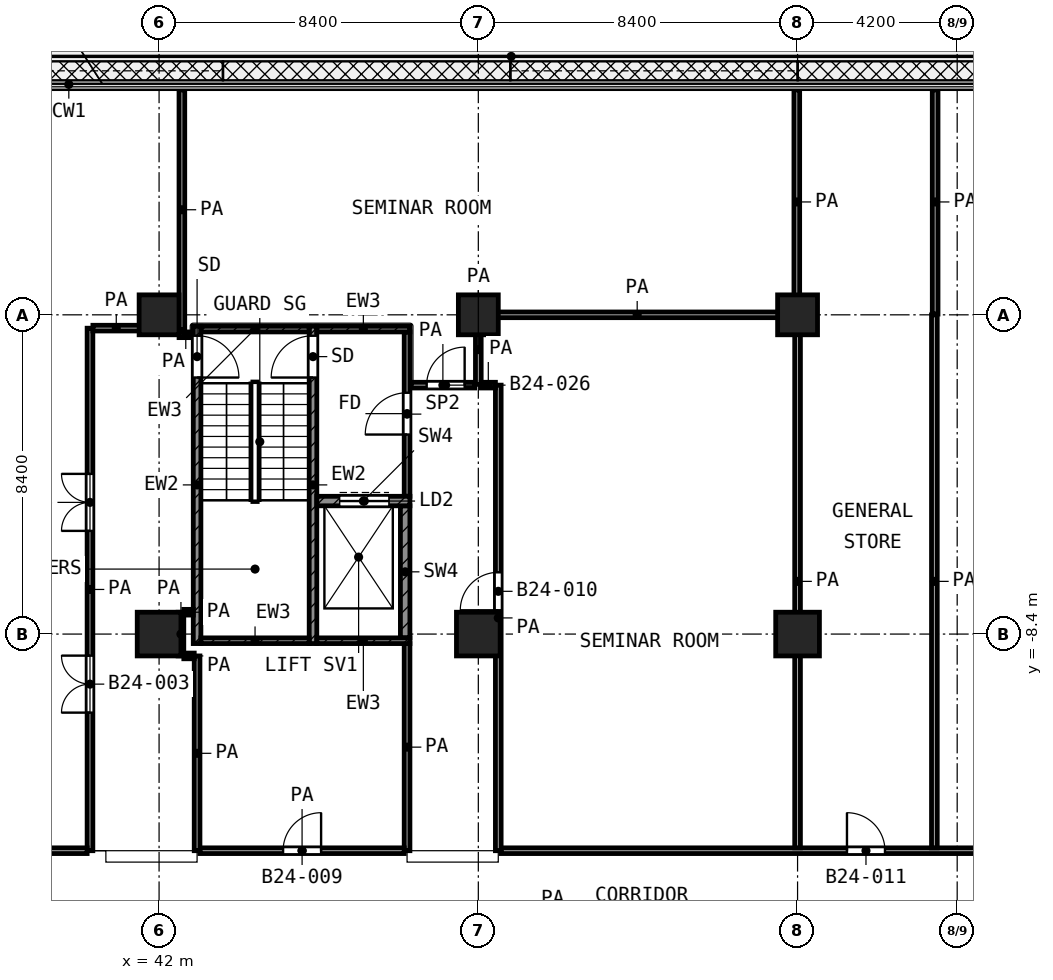
"""IFC4 building model, lengths in metres.
Left out: names, types, materials, properties, quantities, classifications, styles, units other than length and angle.
Written with IfcOpenShell. Run it as: python <this file> out.ifc"""

import sys

from ifc_helpers import new_model, si_unit, direction, frame, frame_2d, origin, origin_2d, place, context, subcontext, project, spatial, rectangle, extrude, element, fill, save


model = new_model("IFC4")
c1 = context("Model", 3, precision=1e-05, world=origin(), true_north=direction((0.0, 1.0)))
c2 = subcontext(c1, "Body", "Model", "MODEL_VIEW")
j1 = project(units=[si_unit("LENGTHUNIT", "METRE"), si_unit("PLANEANGLEUNIT", "RADIAN")], contexts=[c1])
p1 = place(None, origin())
s1 = spatial("IfcSite", under=j1, at=p1, CompositionType="ELEMENT")
p2 = place(p1, origin())
s2 = spatial("IfcBuilding", under=s1, at=p2, CompositionType="ELEMENT")
p3 = place(p2, frame((0.0, 0.0, 107.2)))
s3 = spatial("IfcBuildingStorey", under=s2, at=p3, CompositionType="ELEMENT", Elevation=107.2)
for number, where, z_axis, x_axis in (
    (1, (42.0, 0.0, 0.0), (0.0, 0.0, 1.0), (1.0, 0.0, 0.0)),
    (2, (50.4, 0.0, 0.0), (0.0, 0.0, 1.0), (1.0, 0.0, 0.0)),
    (3, (58.8, 0.0, 0.0), (0.0, 0.0, 1.0), (1.0, 0.0, 0.0)),
):
    element("IfcColumn", number, at=place(p3, frame(where, z_axis=z_axis, x_axis=x_axis)), inside=s3, PredefinedType="COLUMN", context=c2, shape_type="SweptSolid", body=[
        extrude(rectangle(XDim=1.05, YDim=1.05, at=origin_2d()), origin(), (0.0, 0.0, 1.0), 4.2),
    ])
for number, where, z_axis, x_axis in (
    (4, (42.0, -8.4, 0.0), (0.0, 0.0, 1.0), (1.0, 0.0, 0.0)),
    (5, (50.4, -8.4, 0.0), (0.0, 0.0, 1.0), (1.0, 0.0, 0.0)),
    (6, (58.8, -8.4, 0.0), (0.0, 0.0, 1.0), (1.0, 0.0, 0.0)),
):
    element("IfcColumn", number, at=place(p3, frame(where, z_axis=z_axis, x_axis=x_axis)), inside=s3, PredefinedType="COLUMN", context=c2, shape_type="SweptSolid", body=[
        extrude(rectangle(XDim=1.15, YDim=1.15, at=origin_2d()), origin(), (0.0, 0.0, 1.0), 4.2),
    ])
p4 = place(p3, frame((43.0, -8.65, 0.0), z_axis=(0.0, 0.0, 1.0), x_axis=(0.0, 1.0, 0.0)))
e7 = element("IfcWall", 7, at=p4, inside=s3, PredefinedType="SHEAR", context=c2, shape_type="SweptSolid", body=[
    extrude(rectangle(XDim=8.35, YDim=0.2, at=frame_2d((4.175, 0.0))), origin(), (0.0, 0.0, 1.0), 3.6),
])
p5 = place(p4, frame((7.0, 0.0, 0.0)))
e8 = element("IfcOpeningElement", 8, at=p5, cuts=e7, PredefinedType="OPENING", context=c2, shape_type="SweptSolid", body=[
    extrude(rectangle(XDim=1.1, YDim=2.1, at=frame_2d((0.55, 1.05))), frame((0.0, 0.11, 0.0), z_axis=(0.0, -1.0, 0.0), x_axis=(1.0, 0.0, 0.0)), (0.0, 0.0, 1.0), 0.22),
])
p6 = place(p3, frame((46.05, -8.65, 0.0), z_axis=(0.0, 0.0, 1.0), x_axis=(0.0, 1.0, 0.0)))
e9 = element("IfcWall", 9, at=p6, inside=s3, PredefinedType="SHEAR", context=c2, shape_type="SweptSolid", body=[
    extrude(rectangle(XDim=8.35, YDim=0.2, at=frame_2d((4.175, 0.0))), origin(), (0.0, 0.0, 1.0), 3.6),
])
p7 = place(p6, frame((7.0, 0.0, 0.0)))
e10 = element("IfcOpeningElement", 10, at=p7, cuts=e9, PredefinedType="OPENING", context=c2, shape_type="SweptSolid", body=[
    extrude(rectangle(XDim=1.1, YDim=2.1, at=frame_2d((0.55, 1.05))), frame((0.0, 0.11, 0.0), z_axis=(0.0, -1.0, 0.0), x_axis=(1.0, 0.0, 0.0)), (0.0, 0.0, 1.0), 0.22),
])
p8 = place(p3, frame((43.1, -0.375, 0.0), z_axis=(0.0, 0.0, 1.0), x_axis=(1.0, 0.0, 0.0)))
e11 = element("IfcWall", 11, at=p8, inside=s3, PredefinedType="SHEAR", context=c2, shape_type="SweptSolid", body=[
    extrude(rectangle(XDim=2.85, YDim=0.15, at=frame_2d((1.425, 0.0))), origin(), (0.0, 0.0, 1.0), 3.6),
])
p9 = place(p3, frame((46.15, -0.375, 0.0), z_axis=(0.0, 0.0, 1.0), x_axis=(1.0, 0.0, 0.0)))
e12 = element("IfcWall", 12, at=p9, inside=s3, PredefinedType="SHEAR", context=c2, shape_type="SweptSolid", body=[
    extrude(rectangle(XDim=2.45, YDim=0.15, at=frame_2d((1.225, 0.0))), origin(), (0.0, 0.0, 1.0), 3.6),
])
p10 = place(p3, frame((43.1, -8.575, 0.0), z_axis=(0.0, 0.0, 1.0), x_axis=(1.0, 0.0, 0.0)))
e13 = element("IfcWall", 13, at=p10, inside=s3, PredefinedType="SHEAR", context=c2, shape_type="SweptSolid", body=[
    extrude(rectangle(XDim=2.85, YDim=0.15, at=frame_2d((1.425, 0.0))), origin(), (0.0, 0.0, 1.0), 3.6),
])
p11 = place(p3, frame((46.15, -8.575, 0.0), z_axis=(0.0, 0.0, 1.0), x_axis=(1.0, 0.0, 0.0)))
e14 = element("IfcWall", 14, at=p11, inside=s3, PredefinedType="SHEAR", context=c2, shape_type="SweptSolid", body=[
    extrude(rectangle(XDim=2.45, YDim=0.15, at=frame_2d((1.225, 0.0))), origin(), (0.0, 0.0, 1.0), 3.6),
])
p12 = place(p3, frame((46.15, -4.9, 0.0), z_axis=(0.0, 0.0, 1.0), x_axis=(1.0, 0.0, 0.0)))
e15 = element("IfcWall", 15, at=p12, inside=s3, PredefinedType="SHEAR", context=c2, shape_type="SweptSolid", body=[
    extrude(rectangle(XDim=2.45, YDim=0.25, at=frame_2d((1.225, 0.0))), origin(), (0.0, 0.0, 1.0), 3.6),
])
p13 = place(p12, frame((0.6, 0.0, 0.0)))
e16 = element("IfcOpeningElement", 16, at=p13, cuts=e15, PredefinedType="OPENING", context=c2, shape_type="SweptSolid", body=[
    extrude(rectangle(XDim=1.3, YDim=2.1, at=frame_2d((0.65, 1.05))), frame((0.0, 0.135, 0.0), z_axis=(0.0, -1.0, 0.0), x_axis=(1.0, 0.0, 0.0)), (0.0, 0.0, 1.0), 0.27),
])
p14 = place(p3, frame((48.475, -8.5, 0.0), z_axis=(0.0, 0.0, 1.0), x_axis=(0.0, 1.0, 0.0)))
e17 = element("IfcWall", 17, at=p14, inside=s3, PredefinedType="SHEAR", context=c2, shape_type="SweptSolid", body=[
    extrude(rectangle(XDim=3.475, YDim=0.25, at=frame_2d((1.738, 0.0))), origin(), (0.0, 0.0, 1.0), 3.6),
])
p15 = place(p3, frame((48.525, -4.775, 0.0), z_axis=(0.0, 0.0, 1.0), x_axis=(0.0, 1.0, 0.0)))
e18 = element("IfcWall", 18, at=p15, inside=s3, PredefinedType="PARTITIONING", context=c2, shape_type="SweptSolid", body=[
    extrude(rectangle(XDim=4.325, YDim=0.15, at=frame_2d((2.163, 0.0))), origin(), (0.0, 0.0, 1.0), 3.6),
])
p16 = place(p15, frame((1.625, 0.0, 0.0)))
e19 = element("IfcOpeningElement", 19, at=p16, cuts=e18, PredefinedType="OPENING", context=c2, shape_type="SweptSolid", body=[
    extrude(rectangle(XDim=1.1, YDim=2.1, at=frame_2d((0.55, 1.05))), frame((0.0, 0.085, 0.0), z_axis=(0.0, -1.0, 0.0), x_axis=(1.0, 0.0, 0.0)), (0.0, 0.0, 1.0), 0.17),
])
p17 = place(p3, frame((29.475, -14.1, 0.0), z_axis=(0.0, 0.0, 1.0), x_axis=(1.0, 0.0, 0.0)))
e20 = element("IfcWall", 20, at=p17, inside=s3, PredefinedType="PARTITIONING", context=c2, shape_type="SweptSolid", body=[
    extrude(rectangle(XDim=10.632, YDim=0.15, at=frame_2d((5.316, 0.0))), origin(), (0.0, 0.0, 1.0), 3.6),
])
p18 = place(p3, frame((43.075, -14.1, 0.0), z_axis=(0.0, 0.0, 1.0), x_axis=(1.0, 0.0, 0.0)))
e21 = element("IfcWall", 21, at=p18, inside=s3, PredefinedType="PARTITIONING", context=c2, shape_type="SweptSolid", body=[
    extrude(rectangle(XDim=5.375, YDim=0.15, at=frame_2d((2.688, 0.0))), origin(), (0.0, 0.0, 1.0), 3.6),
])
p19 = place(p18, frame((2.188, 0.0, 0.0)))
e22 = element("IfcOpeningElement", 22, at=p19, cuts=e21, PredefinedType="OPENING", context=c2, shape_type="SweptSolid", body=[
    extrude(rectangle(XDim=1.0, YDim=2.1, at=frame_2d((0.5, 1.05))), frame((0.0, 0.085, 0.0), z_axis=(0.0, -1.0, 0.0), x_axis=(1.0, 0.0, 0.0)), (0.0, 0.0, 1.0), 0.17),
])
p20 = place(p3, frame((51.0, -14.1, 0.0), z_axis=(0.0, 0.0, 1.0), x_axis=(1.0, 0.0, 0.0)))
e23 = element("IfcWall", 23, at=p20, inside=s3, PredefinedType="PARTITIONING", context=c2, shape_type="SweptSolid", body=[
    extrude(rectangle(XDim=28.72, YDim=0.15, at=frame_2d((14.36, 0.0))), origin(), (0.0, 0.0, 1.0), 3.6),
])
p21 = place(p20, frame((9.1, 0.0, 0.0)))
e24 = element("IfcOpeningElement", 24, at=p21, cuts=e23, PredefinedType="OPENING", context=c2, shape_type="SweptSolid", body=[
    extrude(rectangle(XDim=1.0, YDim=2.1, at=frame_2d((0.5, 1.05))), frame((0.0, 0.085, 0.0), z_axis=(0.0, -1.0, 0.0), x_axis=(1.0, 0.0, 0.0)), (0.0, 0.0, 1.0), 0.17),
])
p22 = place(p20, frame((19.35, 0.0, 0.0)))
e25 = element("IfcOpeningElement", 25, at=p22, cuts=e23, PredefinedType="OPENING", context=c2, shape_type="SweptSolid", body=[
    extrude(rectangle(XDim=1.5, YDim=2.1, at=frame_2d((0.75, 1.05))), frame((0.0, 0.085, 0.0), z_axis=(0.0, -1.0, 0.0), x_axis=(1.0, 0.0, 0.0)), (0.0, 0.0, 1.0), 0.17),
])
p23 = place(p3, frame((42.651, -8.975, 0.0), z_axis=(0.0, 0.0, 1.0), x_axis=(1.0, 0.0, 0.0)))
e26 = element("IfcWall", 26, at=p23, inside=s3, PredefinedType="PARTITIONING", context=c2, shape_type="SweptSolid", body=[
    extrude(rectangle(XDim=0.274, YDim=0.15, at=frame_2d((0.137, 0.0))), origin(), (0.0, 0.0, 1.0), 3.6),
])
p24 = place(p3, frame((42.651, -7.825, 0.0), z_axis=(0.0, 0.0, 1.0), x_axis=(1.0, 0.0, 0.0)))
e27 = element("IfcWall", 27, at=p24, inside=s3, PredefinedType="PARTITIONING", context=c2, shape_type="SweptSolid", body=[
    extrude(rectangle(XDim=0.249, YDim=0.15, at=frame_2d((0.125, 0.0))), origin(), (0.0, 0.0, 1.0), 3.6),
])
p25 = place(p3, frame((48.63, -1.85, 0.0), z_axis=(0.0, 0.0, 1.0), x_axis=(1.0, 0.0, 0.0)))
e28 = element("IfcWall", 28, at=p25, inside=s3, PredefinedType="PARTITIONING", context=c2, shape_type="SweptSolid", body=[
    extrude(rectangle(XDim=1.675, YDim=0.15, at=frame_2d((0.837, 0.0))), origin(), (0.0, 0.0, 1.0), 3.6),
])
p26 = place(p25, frame((0.41, 0.0, 0.0)))
e29 = element("IfcOpeningElement", 29, at=p26, cuts=e28, PredefinedType="OPENING", context=c2, shape_type="SweptSolid", body=[
    extrude(rectangle(XDim=1.0, YDim=2.1, at=frame_2d((0.5, 1.05))), frame((0.0, 0.085, 0.0), z_axis=(0.0, -1.0, 0.0), x_axis=(1.0, 0.0, 0.0)), (0.0, 0.0, 1.0), 0.17),
])
p27 = place(p3, frame((50.475, -1.85, 0.0), z_axis=(0.0, 0.0, 1.0), x_axis=(1.0, 0.0, 0.0)))
e30 = element("IfcWall", 30, at=p27, inside=s3, PredefinedType="PARTITIONING", context=c2, shape_type="SweptSolid", body=[
    extrude(rectangle(XDim=0.375, YDim=0.15, at=frame_2d((0.188, 0.0))), origin(), (0.0, 0.0, 1.0), 3.6),
])
p28 = place(p3, frame((42.526, -0.525, 0.0), z_axis=(0.0, 0.0, 1.0), x_axis=(1.0, 0.0, 0.0)))
e31 = element("IfcWall", 31, at=p28, inside=s3, PredefinedType="PARTITIONING", context=c2, shape_type="SweptSolid", body=[
    extrude(rectangle(XDim=0.353, YDim=0.15, at=frame_2d((0.177, 0.0))), origin(), (0.0, 0.0, 1.0), 3.6),
])
p29 = place(p3, frame((40.259, -0.35, 0.0), z_axis=(0.0, 0.0, 1.0), x_axis=(1.0, 0.0, 0.0)))
e32 = element("IfcWall", 32, at=p29, inside=s3, PredefinedType="PARTITIONING", context=c2, shape_type="SweptSolid", body=[
    extrude(rectangle(XDim=1.229, YDim=0.15, at=frame_2d((0.615, 0.0))), origin(), (0.0, 0.0, 1.0), 3.6),
])
p30 = place(p3, frame((50.475, 0.0, 0.0), z_axis=(0.0, 0.0, 1.0), x_axis=(1.0, 0.0, 0.0)))
e33 = element("IfcWall", 33, at=p30, inside=s3, PredefinedType="PARTITIONING", context=c2, shape_type="SweptSolid", body=[
    extrude(rectangle(XDim=8.21, YDim=0.15, at=frame_2d((4.105, 0.0))), origin(), (0.0, 0.0, 1.0), 3.6),
])
p31 = place(p3, frame((40.182, -14.1, 0.0), z_axis=(0.0, 0.0, 1.0), x_axis=(0.0, 1.0, 0.0)))
e34 = element("IfcWall", 34, at=p31, inside=s3, PredefinedType="PARTITIONING", context=c2, shape_type="SweptSolid", body=[
    extrude(rectangle(XDim=13.748, YDim=0.15, at=frame_2d((6.874, 0.0))), origin(), (0.0, 0.0, 1.0), 3.6),
])
p32 = place(p31, frame((3.633, 0.0, 0.0)))
e35 = element("IfcOpeningElement", 35, at=p32, cuts=e34, PredefinedType="OPENING", context=c2, shape_type="SweptSolid", body=[
    extrude(rectangle(XDim=1.5, YDim=2.1, at=frame_2d((0.75, 1.05))), frame((0.0, 0.085, 0.0), z_axis=(0.0, -1.0, 0.0), x_axis=(1.0, 0.0, 0.0)), (0.0, 0.0, 1.0), 0.17),
])
p33 = place(p31, frame((8.415, 0.0, 0.0)))
e36 = element("IfcOpeningElement", 36, at=p33, cuts=e34, PredefinedType="OPENING", context=c2, shape_type="SweptSolid", body=[
    extrude(rectangle(XDim=1.5, YDim=2.1, at=frame_2d((0.75, 1.05))), frame((0.0, 0.085, 0.0), z_axis=(0.0, -1.0, 0.0), x_axis=(1.0, 0.0, 0.0)), (0.0, 0.0, 1.0), 0.17),
])
p34 = place(p3, frame((42.575, -8.974, 0.0), z_axis=(0.0, 0.0, 1.0), x_axis=(0.0, 1.0, 0.0)))
e37 = element("IfcWall", 37, at=p34, inside=s3, PredefinedType="PARTITIONING", context=c2, shape_type="SweptSolid", body=[
    extrude(rectangle(XDim=1.148, YDim=0.15, at=frame_2d((0.574, 0.0))), origin(), (0.0, 0.0, 1.0), 3.6),
])
p35 = place(p3, frame((42.6, -0.39, 0.0), z_axis=(0.0, 0.0, 1.0), x_axis=(0.0, 1.0, 0.0)))
e38 = element("IfcWall", 38, at=p35, inside=s3, PredefinedType="PARTITIONING", context=c2, shape_type="SweptSolid", body=[
    extrude(rectangle(XDim=6.31, YDim=0.15, at=frame_2d((3.155, 0.0))), origin(), (0.0, 0.0, 1.0), 3.6),
])
p36 = place(p3, frame((43.0, -14.1, 0.0), z_axis=(0.0, 0.0, 1.0), x_axis=(0.0, 1.0, 0.0)))
e39 = element("IfcWall", 39, at=p36, inside=s3, PredefinedType="PARTITIONING", context=c2, shape_type="SweptSolid", body=[
    extrude(rectangle(XDim=5.125, YDim=0.15, at=frame_2d((2.562, 0.0))), origin(), (0.0, 0.0, 1.0), 3.6),
])
p37 = place(p3, frame((48.525, -14.1, 0.0), z_axis=(0.0, 0.0, 1.0), x_axis=(0.0, 1.0, 0.0)))
e40 = element("IfcWall", 40, at=p37, inside=s3, PredefinedType="PARTITIONING", context=c2, shape_type="SweptSolid", body=[
    extrude(rectangle(XDim=5.45, YDim=0.15, at=frame_2d((2.725, 0.0))), origin(), (0.0, 0.0, 1.0), 3.6),
])
p38 = place(p3, frame((50.4, -1.83, 0.0), z_axis=(0.0, 0.0, 1.0), x_axis=(0.0, 1.0, 0.0)))
e41 = element("IfcWall", 41, at=p38, inside=s3, PredefinedType="PARTITIONING", context=c2, shape_type="SweptSolid", body=[
    extrude(rectangle(XDim=1.83, YDim=0.15, at=frame_2d((0.915, 0.0))), origin(), (0.0, 0.0, 1.0), 3.6),
])
p39 = place(p3, frame((50.925, -14.1, 0.0), z_axis=(0.0, 0.0, 1.0), x_axis=(0.0, 1.0, 0.0)))
e42 = element("IfcWall", 42, at=p39, inside=s3, PredefinedType="PARTITIONING", context=c2, shape_type="SweptSolid", body=[
    extrude(rectangle(XDim=12.25, YDim=0.15, at=frame_2d((6.125, 0.0))), origin(), (0.0, 0.0, 1.0), 3.6),
])
p40 = place(p39, frame((6.325, 0.0, 0.0)))
e43 = element("IfcOpeningElement", 43, at=p40, cuts=e42, PredefinedType="OPENING", context=c2, shape_type="SweptSolid", body=[
    extrude(rectangle(XDim=1.0, YDim=2.1, at=frame_2d((0.5, 1.05))), frame((0.0, 0.085, 0.0), z_axis=(0.0, -1.0, 0.0), x_axis=(1.0, 0.0, 0.0)), (0.0, 0.0, 1.0), 0.17),
])
p41 = place(p3, frame((58.78, 0.02, 0.0), z_axis=(0.0, 0.0, 1.0), x_axis=(0.0, 1.0, 0.0)))
e44 = element("IfcWall", 44, at=p41, inside=s3, PredefinedType="PARTITIONING", context=c2, shape_type="SweptSolid", body=[
    extrude(rectangle(XDim=5.9, YDim=0.15, at=frame_2d((2.95, 0.0))), origin(), (0.0, 0.0, 1.0), 3.6),
])
for number, where, z_axis, x_axis in (
    (45, (58.8, -14.025, 0.0), (0.0, 0.0, 1.0), (0.0, 1.0, 0.0)),
    (46, (62.4, -14.025, 0.0), (0.0, 0.0, 1.0), (0.0, 1.0, 0.0)),
):
    element("IfcWall", number, at=place(p3, frame(where, z_axis=z_axis, x_axis=x_axis)), inside=s3, PredefinedType="PARTITIONING", context=c2, shape_type="SweptSolid", body=[
        extrude(rectangle(XDim=14.023, YDim=0.15, at=frame_2d((7.011, 0.0))), origin(), (0.0, 0.0, 1.0), 3.6),
    ])
p42 = place(p3, frame((62.42, 0.02, 0.0), z_axis=(0.0, 0.0, 1.0), x_axis=(0.0, 1.0, 0.0)))
e47 = element("IfcWall", 47, at=p42, inside=s3, PredefinedType="PARTITIONING", context=c2, shape_type="SweptSolid", body=[
    extrude(rectangle(XDim=5.9, YDim=0.15, at=frame_2d((2.95, 0.0))), origin(), (0.0, 0.0, 1.0), 3.6),
])
p43 = place(p5, frame((1.1, 0.0, 0.0), z_axis=(0.0, 0.0, 1.0), x_axis=(-1.0, 0.0, 0.0)))
e48 = element("IfcDoor", 48, at=p43, inside=s3, OperationType="SINGLE_SWING_LEFT", PredefinedType="DOOR", context=c2, shape_type="SweptSolid", body=[
    extrude(rectangle(XDim=1.1, YDim=2.1, at=frame_2d((0.55, 1.05))), frame((0.0, 0.025, 0.0), z_axis=(0.0, -1.0, 0.0), x_axis=(1.0, 0.0, 0.0)), (0.0, 0.0, 1.0), 0.05),
])
fill(e8, e48)
p44 = place(p7, origin())
e49 = element("IfcDoor", 49, at=p44, inside=s3, OperationType="SINGLE_SWING_LEFT", PredefinedType="DOOR", context=c2, shape_type="SweptSolid", body=[
    extrude(rectangle(XDim=1.1, YDim=2.1, at=frame_2d((0.55, 1.05))), frame((0.0, 0.025, 0.0), z_axis=(0.0, -1.0, 0.0), x_axis=(1.0, 0.0, 0.0)), (0.0, 0.0, 1.0), 0.05),
])
fill(e10, e49)
p45 = place(p13, origin())
e50 = element("IfcDoor", 50, at=p45, inside=s3, OperationType="DOUBLE_DOOR_SLIDING", PredefinedType="DOOR", context=c2, shape_type="SweptSolid", body=[
    extrude(rectangle(XDim=1.3, YDim=2.1, at=frame_2d((0.65, 1.05))), frame((0.0, 0.025, 0.0), z_axis=(0.0, -1.0, 0.0), x_axis=(1.0, 0.0, 0.0)), (0.0, 0.0, 1.0), 0.05),
])
fill(e16, e50)
p46 = place(p16, origin())
e51 = element("IfcDoor", 51, at=p46, inside=s3, OperationType="SINGLE_SWING_LEFT", PredefinedType="DOOR", context=c2, shape_type="SweptSolid", body=[
    extrude(rectangle(XDim=1.1, YDim=2.1, at=frame_2d((0.55, 1.05))), frame((0.0, 0.025, 0.0), z_axis=(0.0, -1.0, 0.0), x_axis=(1.0, 0.0, 0.0)), (0.0, 0.0, 1.0), 0.05),
])
fill(e19, e51)
p47 = place(p19, origin())
e52 = element("IfcDoor", 52, at=p47, inside=s3, OperationType="SINGLE_SWING_RIGHT", PredefinedType="DOOR", context=c2, shape_type="SweptSolid", body=[
    extrude(rectangle(XDim=1.0, YDim=2.1, at=frame_2d((0.5, 1.05))), frame((0.0, 0.025, 0.0), z_axis=(0.0, -1.0, 0.0), x_axis=(1.0, 0.0, 0.0)), (0.0, 0.0, 1.0), 0.05),
])
fill(e22, e52)
p48 = place(p40, origin())
e53 = element("IfcDoor", 53, at=p48, inside=s3, OperationType="SINGLE_SWING_LEFT", PredefinedType="DOOR", context=c2, shape_type="SweptSolid", body=[
    extrude(rectangle(XDim=1.0, YDim=2.1, at=frame_2d((0.5, 1.05))), frame((0.0, 0.025, 0.0), z_axis=(0.0, -1.0, 0.0), x_axis=(1.0, 0.0, 0.0)), (0.0, 0.0, 1.0), 0.05),
])
fill(e43, e53)
p49 = place(p21, origin())
e54 = element("IfcDoor", 54, at=p49, inside=s3, OperationType="SINGLE_SWING_LEFT", PredefinedType="DOOR", context=c2, shape_type="SweptSolid", body=[
    extrude(rectangle(XDim=1.0, YDim=2.1, at=frame_2d((0.5, 1.05))), frame((0.0, 0.025, 0.0), z_axis=(0.0, -1.0, 0.0), x_axis=(1.0, 0.0, 0.0)), (0.0, 0.0, 1.0), 0.05),
])
fill(e24, e54)
p50 = place(p32, origin())
e55 = element("IfcDoor", 55, at=p50, inside=s3, OperationType="DOUBLE_DOOR_SINGLE_SWING", PredefinedType="DOOR", context=c2, shape_type="SweptSolid", body=[
    extrude(rectangle(XDim=1.5, YDim=2.1, at=frame_2d((0.75, 1.05))), frame((0.0, 0.025, 0.0), z_axis=(0.0, -1.0, 0.0), x_axis=(1.0, 0.0, 0.0)), (0.0, 0.0, 1.0), 0.05),
])
fill(e35, e55)
p51 = place(p33, origin())
e56 = element("IfcDoor", 56, at=p51, inside=s3, OperationType="DOUBLE_DOOR_SINGLE_SWING", PredefinedType="DOOR", context=c2, shape_type="SweptSolid", body=[
    extrude(rectangle(XDim=1.5, YDim=2.1, at=frame_2d((0.75, 1.05))), frame((0.0, 0.025, 0.0), z_axis=(0.0, -1.0, 0.0), x_axis=(1.0, 0.0, 0.0)), (0.0, 0.0, 1.0), 0.05),
])
fill(e36, e56)
p52 = place(p26, origin())
e57 = element("IfcDoor", 57, at=p52, inside=s3, OperationType="SINGLE_SWING_RIGHT", PredefinedType="DOOR", context=c2, shape_type="SweptSolid", body=[
    extrude(rectangle(XDim=1.0, YDim=2.1, at=frame_2d((0.5, 1.05))), frame((0.0, 0.025, 0.0), z_axis=(0.0, -1.0, 0.0), x_axis=(1.0, 0.0, 0.0)), (0.0, 0.0, 1.0), 0.05),
])
fill(e29, e57)
save(model, sys.argv[1])
